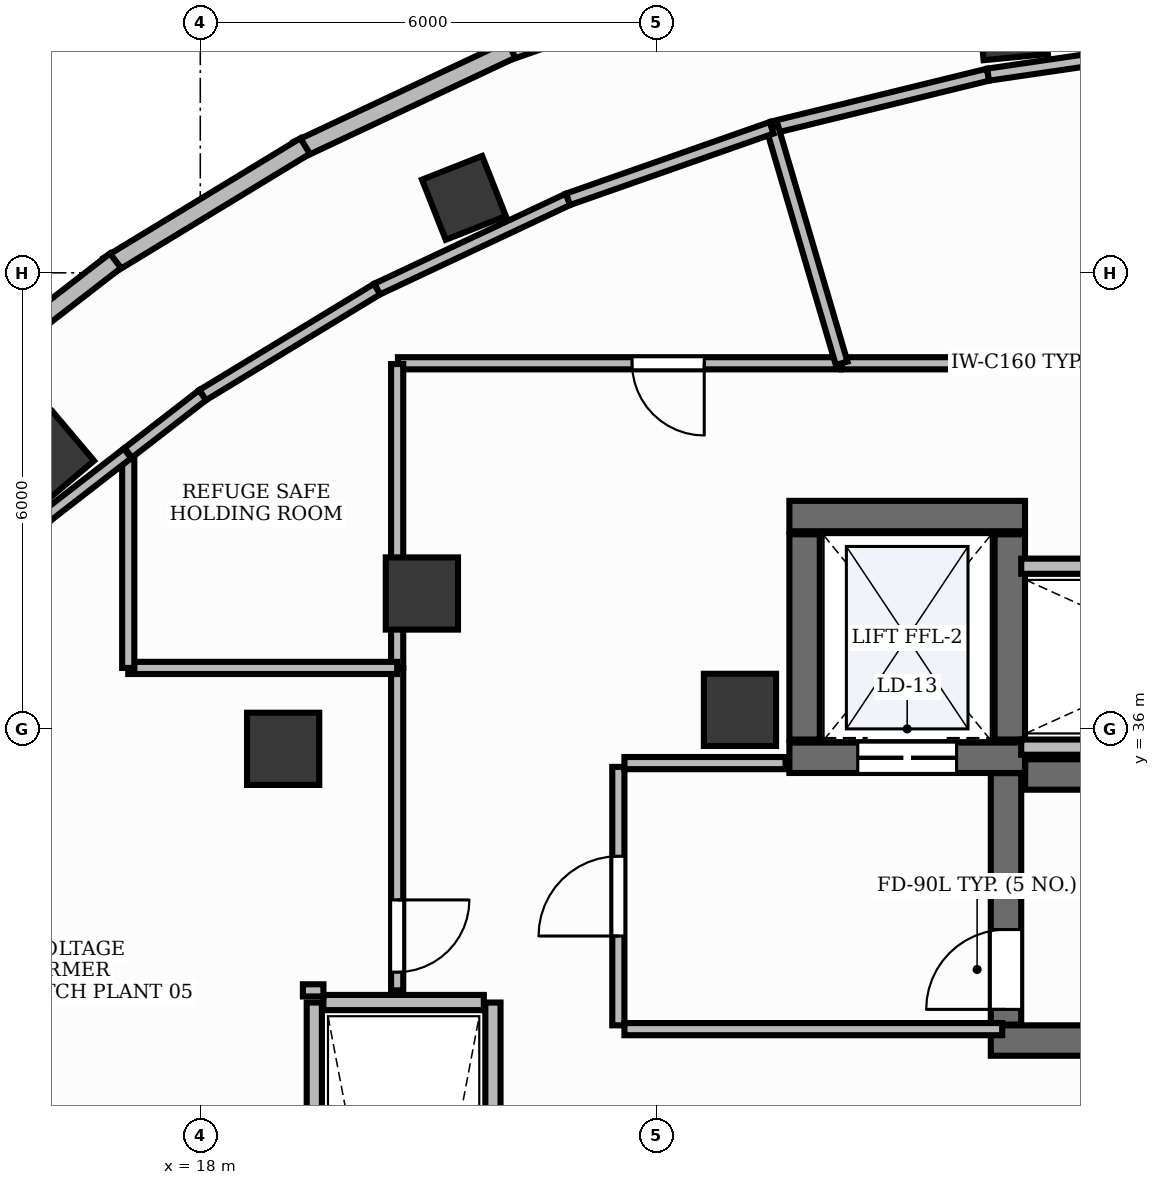
"""IFC4 building model, lengths in metres.
Left out: names, types, materials, properties, quantities, classifications, styles, units other than length and angle.
Written with IfcOpenShell. Run it as: python <this file> out.ifc"""

import sys

from ifc_helpers import new_model, si_unit, direction, frame, frame_2d, origin, origin_2d, place, context, subcontext, project, spatial, rectangle, extrude, element, fill, save


model = new_model("IFC4")
c1 = context("Model", 3, precision=1e-05, world=origin(), true_north=direction((0.0, 1.0)))
c2 = subcontext(c1, "Body", "Model", "MODEL_VIEW")
j1 = project(units=[si_unit("LENGTHUNIT", "METRE"), si_unit("PLANEANGLEUNIT", "RADIAN")], contexts=[c1])
p1 = place(None, origin())
s1 = spatial("IfcSite", under=j1, at=p1, CompositionType="ELEMENT")
p2 = place(p1, origin())
s2 = spatial("IfcBuilding", under=s1, at=p2, CompositionType="ELEMENT")
p3 = place(p2, frame((0.0, 0.0, 277.2)))
s3 = spatial("IfcBuildingStorey", under=s2, at=p3, CompositionType="ELEMENT", Elevation=277.2)
p4 = place(p3, frame((28.852, 35.4, 0.0), z_axis=(0.0, 0.0, 1.0), x_axis=(1.0, 0.0, 0.0)))
e1 = element("IfcWall", 1, at=p4, inside=s3, PredefinedType="SHEAR", context=c2, shape_type="SweptSolid", body=[
    extrude(rectangle(XDim=8.198, YDim=0.4, at=frame_2d((4.099, 0.0))), origin(), (0.0, 0.0, 1.0), 5.1),
])
p5 = place(p3, frame((28.4, 31.9, 0.0), z_axis=(0.0, 0.0, 1.0), x_axis=(1.0, 0.0, 0.0)))
e2 = element("IfcWall", 2, at=p5, inside=s3, PredefinedType="SHEAR", context=c2, shape_type="SweptSolid", body=[
    extrude(rectangle(XDim=8.65, YDim=0.4, at=frame_2d((4.325, 0.0))), origin(), (0.0, 0.0, 1.0), 5.1),
])
p6 = place(p3, frame((28.6, 32.11, 0.0), z_axis=(0.0, 0.0, 1.0), x_axis=(0.0, 1.0, 0.0)))
e3 = element("IfcWall", 3, at=p6, inside=s3, PredefinedType="SHEAR", context=c2, shape_type="SweptSolid", body=[
    extrude(rectangle(XDim=3.308, YDim=0.4, at=frame_2d((1.654, 0.0))), origin(), (0.0, 0.0, 1.0), 5.1),
])
p7 = place(p6, frame((0.2, 0.0, 0.0)))
e4 = element("IfcOpeningElement", 4, at=p7, cuts=e3, PredefinedType="OPENING", context=c2, shape_type="SweptSolid", body=[
    extrude(rectangle(XDim=1.05, YDim=2.15, at=frame_2d((0.525, 1.075))), frame((0.0, 0.215, 0.0), z_axis=(0.0, -1.0, 0.0), x_axis=(1.0, 0.0, 0.0)), (0.0, 0.0, 1.0), 0.43),
])
p8 = place(p3, frame((25.75, 38.8, 0.0), z_axis=(0.0, 0.0, 1.0), x_axis=(1.0, 0.0, 0.0)))
e5 = element("IfcWall", 5, at=p8, inside=s3, PredefinedType="SHEAR", context=c2, shape_type="SweptSolid", body=[
    extrude(rectangle(XDim=3.1, YDim=0.4, at=frame_2d((1.55, 0.0))), origin(), (0.0, 0.0, 1.0), 5.1),
])
p9 = place(p3, frame((25.75, 35.62, 0.0), z_axis=(0.0, 0.0, 1.0), x_axis=(1.0, 0.0, 0.0)))
e6 = element("IfcWall", 6, at=p9, inside=s3, PredefinedType="SHEAR", context=c2, shape_type="SweptSolid", body=[
    extrude(rectangle(XDim=3.1, YDim=0.4, at=frame_2d((1.55, 0.0))), origin(), (0.0, 0.0, 1.0), 5.1),
])
p10 = place(p9, frame((0.9, 0.0, 0.0)))
e7 = element("IfcOpeningElement", 7, at=p10, cuts=e6, PredefinedType="OPENING", context=c2, shape_type="SweptSolid", body=[
    extrude(rectangle(XDim=1.3, YDim=2.2, at=frame_2d((0.65, 1.1))), frame((0.0, 0.215, 0.0), z_axis=(0.0, -1.0, 0.0), x_axis=(1.0, 0.0, 0.0)), (0.0, 0.0, 1.0), 0.43),
])
for number, where, z_axis, x_axis in (
    (8, (25.95, 35.86, 0.0), (0.0, 0.0, 1.0), (0.0, 1.0, 0.0)),
    (9, (28.65, 35.86, 0.0), (0.0, 0.0, 1.0), (0.0, 1.0, 0.0)),
):
    element("IfcWall", number, at=place(p3, frame(where, z_axis=z_axis, x_axis=x_axis)), inside=s3, PredefinedType="SHEAR", context=c2, shape_type="SweptSolid", body=[
        extrude(rectangle(XDim=2.7, YDim=0.4, at=frame_2d((1.35, 0.0))), origin(), (0.0, 0.0, 1.0), 5.1),
    ])
p11 = place(p3, frame((25.1, 36.25, -0.0), z_axis=(0.0, 0.0, 1.0), x_axis=(1.0, 0.0, 0.0)))
e10 = element("IfcColumn", 10, at=p11, inside=s3, PredefinedType="PILASTER", context=c2, shape_type="SweptSolid", body=[
    extrude(rectangle(XDim=0.95, YDim=0.95, at=origin_2d()), origin(), (0.0, 0.0, 1.0), 5.101),
])
for number, where, z_axis, x_axis in (
    (11, (28.688, 45.261, -0.0), (0.0, 0.0, 1.0), (0.995, 0.095, 0.0)),
    (12, (21.469, 42.986, -0.0), (0.0, 0.0, 1.0), (0.93, 0.367, 0.0)),
    (13, (16.003, 39.579, -0.0), (0.0, 0.0, 1.0), (0.764, 0.645, 0.0)),
):
    element("IfcColumn", number, at=place(p3, frame(where, z_axis=z_axis, x_axis=x_axis)), inside=s3, PredefinedType="COLUMN", context=c2, shape_type="SweptSolid", body=[
        extrude(rectangle(XDim=0.85, YDim=0.85, at=origin_2d()), origin(), (0.0, 0.0, 1.0), 5.101),
    ])
for number, where, z_axis, x_axis in (
    (14, (20.915, 37.781, -0.0), (0.0, 0.0, 1.0), (1.0, 0.0, 0.0)),
    (15, (19.09, 35.738, -0.0), (0.0, 0.0, 1.0), (1.0, 0.0, 0.0)),
):
    element("IfcColumn", number, at=place(p3, frame(where, z_axis=z_axis, x_axis=x_axis)), inside=s3, PredefinedType="COLUMN", context=c2, shape_type="SweptSolid", body=[
        extrude(rectangle(XDim=0.95, YDim=0.95, at=origin_2d()), origin(), (0.0, 0.0, 1.0), 5.101),
    ])
p12 = place(p3, frame((24.985, 45.947, 0.0), z_axis=(0.0, 0.0, 1.0), x_axis=(-0.943487427594, -0.331408319104, 0.0)))
e16 = element("IfcWall", 16, at=p12, inside=s3, PredefinedType="STANDARD", context=c2, shape_type="SweptSolid", body=[
    extrude(rectangle(XDim=3.176, YDim=0.24, at=frame_2d((1.588, 0.0))), origin(), (0.0, 0.0, 1.0), 5.1),
])
p13 = place(p3, frame((22.092, 44.937, 0.0), z_axis=(0.0, 0.0, 1.0), x_axis=(-0.904975309641, -0.425464086546, 0.0)))
e17 = element("IfcWall", 17, at=p13, inside=s3, PredefinedType="STANDARD", context=c2, shape_type="SweptSolid", body=[
    extrude(rectangle(XDim=3.108, YDim=0.24, at=frame_2d((1.554, 0.0))), origin(), (0.0, 0.0, 1.0), 5.1),
])
p14 = place(p3, frame((19.379, 43.668, 0.0), z_axis=(0.0, 0.0, 1.0), x_axis=(-0.854534567694, -0.519394525016, 0.0)))
e18 = element("IfcWall", 18, at=p14, inside=s3, PredefinedType="STANDARD", context=c2, shape_type="SweptSolid", body=[
    extrude(rectangle(XDim=3.029, YDim=0.24, at=frame_2d((1.515, 0.0))), origin(), (0.0, 0.0, 1.0), 5.1),
])
p15 = place(p3, frame((16.884, 42.159, 0.0), z_axis=(0.0, 0.0, 1.0), x_axis=(-0.790494374307, -0.61246930061, 0.0)))
e19 = element("IfcWall", 19, at=p15, inside=s3, PredefinedType="STANDARD", context=c2, shape_type="SweptSolid", body=[
    extrude(rectangle(XDim=2.943, YDim=0.24, at=frame_2d((1.471, 0.0))), origin(), (0.0, 0.0, 1.0), 5.1),
])
for number, where, z_axis, x_axis in (
    (20, (19.5, 21.6, 0.0), (0.0, 0.0, 1.0), (0.0, 1.0, 0.0)),
    (21, (21.85, 21.6, 0.0), (0.0, 0.0, 1.0), (0.0, 1.0, 0.0)),
):
    element("IfcWall", number, at=place(p3, frame(where, z_axis=z_axis, x_axis=x_axis)), inside=s3, PredefinedType="PARTITIONING", context=c2, shape_type="SweptSolid", body=[
        extrude(rectangle(XDim=10.8, YDim=0.2, at=frame_2d((5.4, 0.0))), origin(), (0.0, 0.0, 1.0), 3.41),
    ])
p16 = place(p3, frame((19.62, 32.4, 0.0), z_axis=(0.0, 0.0, 1.0), x_axis=(1.0, 0.0, 0.0)))
e22 = element("IfcWall", 22, at=p16, inside=s3, PredefinedType="PARTITIONING", context=c2, shape_type="SweptSolid", body=[
    extrude(rectangle(XDim=2.11, YDim=0.2, at=frame_2d((1.055, 0.0))), origin(), (0.0, 0.0, 1.0), 3.41),
])
for number, where, z_axis, x_axis in (
    (23, (28.8, 35.76, 0.0), (0.0, 0.0, 1.0), (1.0, 0.0, 0.0)),
    (24, (28.8, 38.14, 0.0), (0.0, 0.0, 1.0), (1.0, 0.0, 0.0)),
):
    element("IfcWall", number, at=place(p3, frame(where, z_axis=z_axis, x_axis=x_axis)), inside=s3, PredefinedType="PARTITIONING", context=c2, shape_type="SweptSolid", body=[
        extrude(rectangle(XDim=4.57, YDim=0.2, at=frame_2d((2.285, 0.0))), origin(), (0.0, 0.0, 1.0), 3.41),
    ])
p17 = place(p3, frame((23.5, 32.1, 0.0), z_axis=(0.0, 0.0, 1.0), x_axis=(0.0, 1.0, 0.0)))
e25 = element("IfcWall", 25, at=p17, inside=s3, PredefinedType="PARTITIONING", context=c2, shape_type="SweptSolid", body=[
    extrude(rectangle(XDim=3.4, YDim=0.16, at=frame_2d((1.7, 0.0))), origin(), (0.0, 0.0, 1.0), 3.41),
])
p18 = place(p17, frame((1.175, 0.0, 0.0)))
e26 = element("IfcOpeningElement", 26, at=p18, cuts=e25, PredefinedType="OPENING", context=c2, shape_type="SweptSolid", body=[
    extrude(rectangle(XDim=1.05, YDim=2.15, at=frame_2d((0.525, 1.075))), frame((0.0, 0.095, 0.0), z_axis=(0.0, -1.0, 0.0), x_axis=(1.0, 0.0, 0.0)), (0.0, 0.0, 1.0), 0.19),
])
p19 = place(p3, frame((23.58, 32.05, 0.0), z_axis=(0.0, 0.0, 1.0), x_axis=(1.0, 0.0, 0.0)))
e27 = element("IfcWall", 27, at=p19, inside=s3, PredefinedType="PARTITIONING", context=c2, shape_type="SweptSolid", body=[
    extrude(rectangle(XDim=4.97, YDim=0.16, at=frame_2d((2.485, 0.0))), origin(), (0.0, 0.0, 1.0), 3.41),
])
p20 = place(p3, frame((23.58, 35.55, 0.0), z_axis=(0.0, 0.0, 1.0), x_axis=(1.0, 0.0, 0.0)))
e28 = element("IfcWall", 28, at=p20, inside=s3, PredefinedType="PARTITIONING", context=c2, shape_type="SweptSolid", body=[
    extrude(rectangle(XDim=2.12, YDim=0.16, at=frame_2d((1.06, 0.0))), origin(), (0.0, 0.0, 1.0), 3.41),
])
p21 = place(p3, frame((37.0, 40.81, 0.0), z_axis=(0.0, 0.0, 1.0), x_axis=(-1.0, 0.0, 0.0)))
e29 = element("IfcWall", 29, at=p21, inside=s3, PredefinedType="PARTITIONING", context=c2, shape_type="SweptSolid", body=[
    extrude(rectangle(XDim=10.562, YDim=0.16, at=frame_2d((5.281, 0.0))), origin(), (0.0, 0.0, 1.0), 3.41),
])
p22 = place(p21, frame((3.57, 0.0, 0.0)))
e30 = element("IfcOpeningElement", 30, at=p22, cuts=e29, PredefinedType="OPENING", context=c2, shape_type="SweptSolid", body=[
    extrude(rectangle(XDim=0.95, YDim=2.15, at=frame_2d((0.475, 1.075))), frame((0.0, 0.095, 0.0), z_axis=(0.0, -1.0, 0.0), x_axis=(1.0, 0.0, 0.0)), (0.0, 0.0, 1.0), 0.19),
])
p23 = place(p3, frame((26.427, 40.81, 0.0), z_axis=(0.0, 0.0, 1.0), x_axis=(-1.0, 0.0, 0.0)))
e31 = element("IfcWall", 31, at=p23, inside=s3, PredefinedType="PARTITIONING", context=c2, shape_type="SweptSolid", body=[
    extrude(rectangle(XDim=5.827, YDim=0.16, at=frame_2d((2.914, 0.0))), origin(), (0.0, 0.0, 1.0), 3.41),
])
p24 = place(p23, frame((1.797, 0.0, 0.0)))
e32 = element("IfcOpeningElement", 32, at=p24, cuts=e31, PredefinedType="OPENING", context=c2, shape_type="SweptSolid", body=[
    extrude(rectangle(XDim=0.95, YDim=2.15, at=frame_2d((0.475, 1.075))), frame((0.0, 0.095, 0.0), z_axis=(0.0, -1.0, 0.0), x_axis=(1.0, 0.0, 0.0)), (0.0, 0.0, 1.0), 0.19),
])
p25 = place(p3, frame((20.59, 36.792, 0.0), z_axis=(0.0, 0.0, 1.0), x_axis=(0.0, -1.0, 0.0)))
e33 = element("IfcWall", 33, at=p25, inside=s3, PredefinedType="PARTITIONING", context=c2, shape_type="SweptSolid", body=[
    extrude(rectangle(XDim=4.232, YDim=0.16, at=frame_2d((2.116, 0.0))), origin(), (0.0, 0.0, 1.0), 3.41),
])
p26 = place(p25, frame((3.042, 0.0, 0.0)))
e34 = element("IfcOpeningElement", 34, at=p26, cuts=e33, PredefinedType="OPENING", context=c2, shape_type="SweptSolid", body=[
    extrude(rectangle(XDim=0.95, YDim=2.15, at=frame_2d((0.475, 1.075))), frame((0.0, 0.095, 0.0), z_axis=(0.0, -1.0, 0.0), x_axis=(1.0, 0.0, 0.0)), (0.0, 0.0, 1.0), 0.19),
])
p27 = place(p3, frame((25.532, 43.913, 0.0), z_axis=(0.0, 0.0, 1.0), x_axis=(0.971298495948, 0.23786389337, 0.0)))
e35 = element("IfcWall", 35, at=p27, inside=s3, PredefinedType="PARTITIONING", context=c2, shape_type="SweptSolid", body=[
    extrude(rectangle(XDim=2.916, YDim=0.16, at=frame_2d((1.458, 0.0))), origin(), (0.0, 0.0, 1.0), 3.41),
])
p28 = place(p3, frame((28.364, 44.607, 0.0), z_axis=(0.0, 0.0, 1.0), x_axis=(0.989458468806, 0.144816913748, 0.0)))
e36 = element("IfcWall", 36, at=p28, inside=s3, PredefinedType="PARTITIONING", context=c2, shape_type="SweptSolid", body=[
    extrude(rectangle(XDim=2.959, YDim=0.16, at=frame_2d((1.479, 0.0))), origin(), (0.0, 0.0, 1.0), 3.41),
])
p29 = place(p3, frame((26.438, 40.81, 0.0), z_axis=(0.0, 0.0, 1.0), x_axis=(-0.282333978725, 0.959316175438, 0.0)))
e37 = element("IfcWall", 37, at=p29, inside=s3, PredefinedType="PARTITIONING", context=c2, shape_type="SweptSolid", body=[
    extrude(rectangle(XDim=3.232, YDim=0.16, at=frame_2d((1.616, 0.0))), origin(), (0.0, 0.0, 1.0), 3.41),
])
p30 = place(p3, frame((20.326, 41.786, 0.0), z_axis=(0.0, 0.0, 1.0), x_axis=(0.904997973685, 0.425415876087, 0.0)))
e38 = element("IfcWall", 38, at=p30, inside=s3, PredefinedType="PARTITIONING", context=c2, shape_type="SweptSolid", body=[
    extrude(rectangle(XDim=2.776, YDim=0.16, at=frame_2d((1.388, 0.0))), origin(), (0.0, 0.0, 1.0), 3.41),
])
p31 = place(p3, frame((22.838, 42.967, 0.0), z_axis=(0.0, 0.0, 1.0), x_axis=(0.943475411787, 0.331442524962, 0.0)))
e39 = element("IfcWall", 39, at=p31, inside=s3, PredefinedType="PARTITIONING", context=c2, shape_type="SweptSolid", body=[
    extrude(rectangle(XDim=2.837, YDim=0.16, at=frame_2d((1.419, 0.0))), origin(), (0.0, 0.0, 1.0), 3.41),
])
p32 = place(p3, frame((20.59, 40.8, 0.0), z_axis=(0.0, 0.0, 1.0), x_axis=(0.0, -1.0, 0.0)))
e40 = element("IfcWall", 40, at=p32, inside=s3, PredefinedType="PARTITIONING", context=c2, shape_type="SweptSolid", body=[
    extrude(rectangle(XDim=3.998, YDim=0.16, at=frame_2d((1.999, 0.0))), origin(), (0.0, 0.0, 1.0), 3.41),
])
p33 = place(p3, frame((20.59, 36.802, 0.0), z_axis=(0.0, 0.0, 1.0), x_axis=(-1.0, 0.0, 0.0)))
e41 = element("IfcWall", 41, at=p33, inside=s3, PredefinedType="PARTITIONING", context=c2, shape_type="SweptSolid", body=[
    extrude(rectangle(XDim=3.538, YDim=0.16, at=frame_2d((1.769, 0.0))), origin(), (0.0, 0.0, 1.0), 3.41),
])
p34 = place(p3, frame((17.052, 36.802, 0.0), z_axis=(0.0, 0.0, 1.0), x_axis=(0.0, 1.0, 0.0)))
e42 = element("IfcWall", 42, at=p34, inside=s3, PredefinedType="PARTITIONING", context=c2, shape_type="SweptSolid", body=[
    extrude(rectangle(XDim=2.831, YDim=0.16, at=frame_2d((1.415, 0.0))), origin(), (0.0, 0.0, 1.0), 3.41),
])
p35 = place(p3, frame((17.052, 39.633, 0.0), z_axis=(0.0, 0.0, 1.0), x_axis=(0.790443669582, 0.612534737969, 0.0)))
e43 = element("IfcWall", 43, at=p35, inside=s3, PredefinedType="PARTITIONING", context=c2, shape_type="SweptSolid", body=[
    extrude(rectangle(XDim=1.239, YDim=0.16, at=frame_2d((0.62, 0.0))), origin(), (0.0, 0.0, 1.0), 3.41),
])
p36 = place(p3, frame((18.031, 40.392, 0.0), z_axis=(0.0, 0.0, 1.0), x_axis=(0.854517984413, 0.519421807701, 0.0)))
e44 = element("IfcWall", 44, at=p36, inside=s3, PredefinedType="PARTITIONING", context=c2, shape_type="SweptSolid", body=[
    extrude(rectangle(XDim=2.685, YDim=0.16, at=frame_2d((1.342, 0.0))), origin(), (0.0, 0.0, 1.0), 3.41),
])
p37 = place(p3, frame((15.989, 38.809, 0.0), z_axis=(0.0, 0.0, 1.0), x_axis=(0.790486056545, 0.612480035927, 0.0)))
e45 = element("IfcWall", 45, at=p37, inside=s3, PredefinedType="PARTITIONING", context=c2, shape_type="SweptSolid", body=[
    extrude(rectangle(XDim=1.332, YDim=0.16, at=frame_2d((0.666, 0.0))), origin(), (0.0, 0.0, 1.0), 3.41),
])
p38 = place(p3, frame((19.62, 32.56, 0.0), z_axis=(0.0, 0.0, 1.0), x_axis=(-1.0, 0.0, 0.0)))
e46 = element("IfcWall", 46, at=p38, inside=s3, PredefinedType="PARTITIONING", context=c2, shape_type="SweptSolid", body=[
    extrude(rectangle(XDim=0.27, YDim=0.16, at=frame_2d((0.135, 0.0))), origin(), (0.0, 0.0, 1.0), 3.41),
])
p39 = place(p7, origin())
e47 = element("IfcDoor", 47, at=p39, inside=s3, OperationType="SINGLE_SWING_LEFT", PredefinedType="DOOR", context=c2, shape_type="SweptSolid", body=[
    extrude(rectangle(XDim=1.05, YDim=2.15, at=frame_2d((0.525, 1.075))), frame((0.0, 0.025, 0.0), z_axis=(0.0, -1.0, 0.0), x_axis=(1.0, 0.0, 0.0)), (0.0, 0.0, 1.0), 0.05),
])
fill(e4, e47)
p40 = place(p10, origin())
e48 = element("IfcDoor", 48, at=p40, inside=s3, OperationType="DOUBLE_DOOR_SLIDING", PredefinedType="DOOR", context=c2, shape_type="SweptSolid", body=[
    extrude(rectangle(XDim=1.3, YDim=2.2, at=frame_2d((0.65, 1.1))), frame((0.0, 0.025, 0.0), z_axis=(0.0, -1.0, 0.0), x_axis=(1.0, 0.0, 0.0)), (0.0, 0.0, 1.0), 0.05),
])
fill(e7, e48)
p41 = place(p18, origin())
e49 = element("IfcDoor", 49, at=p41, inside=s3, OperationType="SINGLE_SWING_LEFT", PredefinedType="DOOR", context=c2, shape_type="SweptSolid", body=[
    extrude(rectangle(XDim=1.05, YDim=2.15, at=frame_2d((0.525, 1.075))), frame((0.0, 0.025, 0.0), z_axis=(0.0, -1.0, 0.0), x_axis=(1.0, 0.0, 0.0)), (0.0, 0.0, 1.0), 0.05),
])
fill(e26, e49)
p42 = place(p24, origin())
e50 = element("IfcDoor", 50, at=p42, inside=s3, OperationType="SINGLE_SWING_LEFT", PredefinedType="DOOR", context=c2, shape_type="SweptSolid", body=[
    extrude(rectangle(XDim=0.95, YDim=2.15, at=frame_2d((0.475, 1.075))), frame((0.0, 0.025, 0.0), z_axis=(0.0, -1.0, 0.0), x_axis=(1.0, 0.0, 0.0)), (0.0, 0.0, 1.0), 0.05),
])
fill(e32, e50)
p43 = place(p26, origin())
e51 = element("IfcDoor", 51, at=p43, inside=s3, OperationType="SINGLE_SWING_LEFT", PredefinedType="DOOR", context=c2, shape_type="SweptSolid", body=[
    extrude(rectangle(XDim=0.95, YDim=2.15, at=frame_2d((0.475, 1.075))), frame((0.0, 0.025, 0.0), z_axis=(0.0, -1.0, 0.0), x_axis=(1.0, 0.0, 0.0)), (0.0, 0.0, 1.0), 0.05),
])
fill(e34, e51)
save(model, sys.argv[1])
